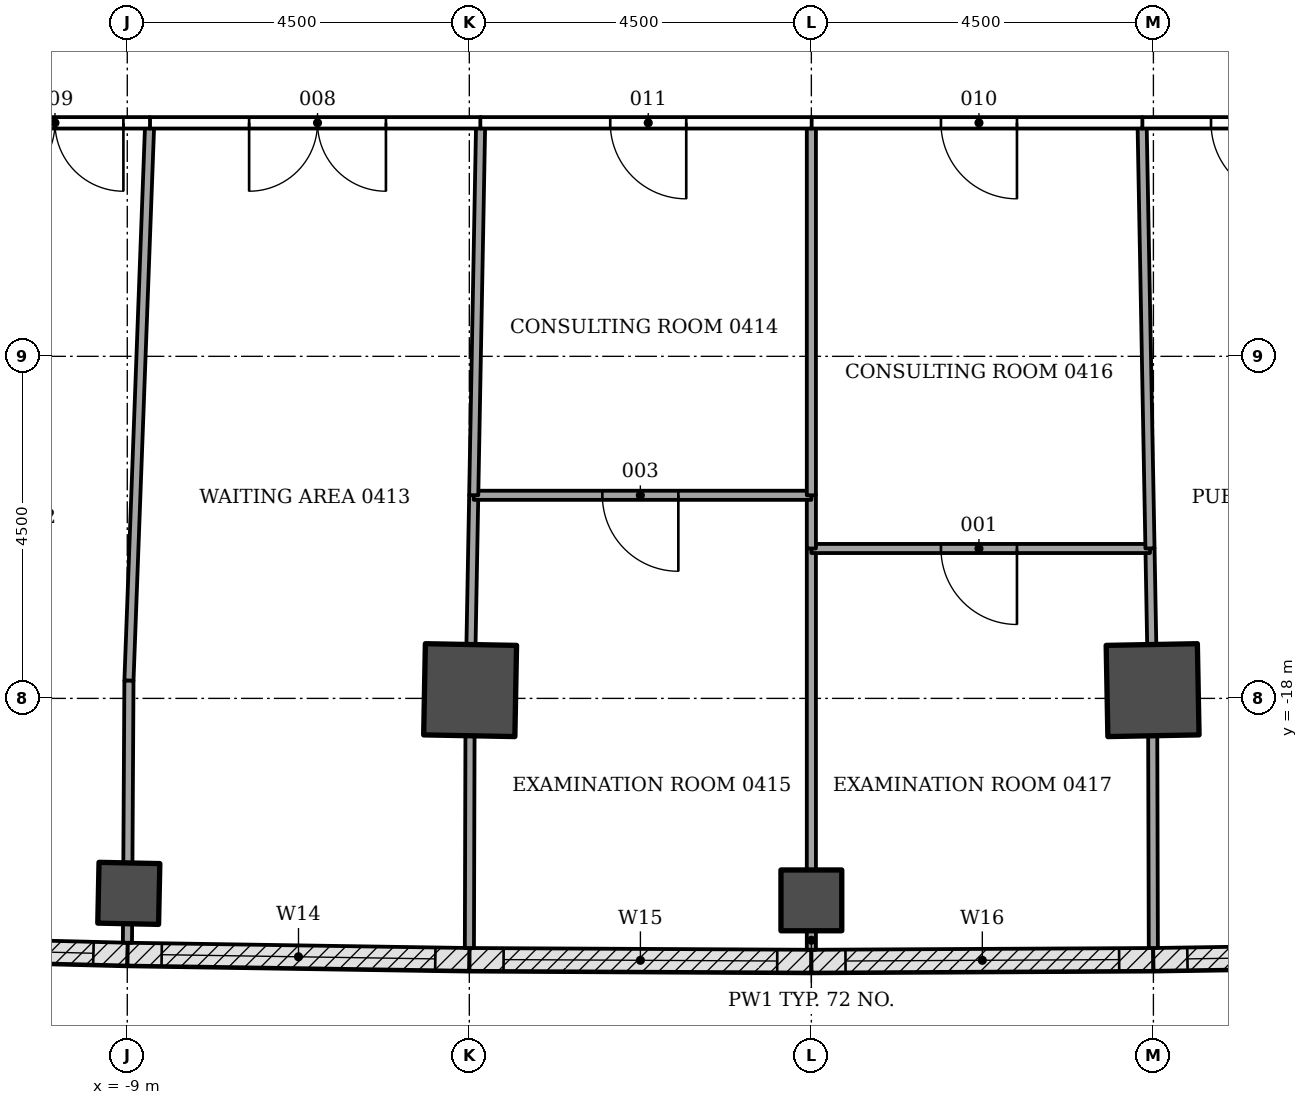
"""IFC4 building model, lengths in metres.
Left out: names, types, materials, properties, quantities, classifications, styles, units other than length and angle.
Written with IfcOpenShell. Run it as: python <this file> out.ifc"""

import sys

from ifc_helpers import new_model, si_unit, direction, frame, frame_2d, origin, origin_2d, place, context, subcontext, project, spatial, rectangle, extrude, element, fill, save


model = new_model("IFC4")
c1 = context("Model", 3, precision=1e-05, world=origin(), true_north=direction((0.0, 1.0)))
c2 = subcontext(c1, "Body", "Model", "MODEL_VIEW")
j1 = project(units=[si_unit("LENGTHUNIT", "METRE"), si_unit("PLANEANGLEUNIT", "RADIAN")], contexts=[c1])
p1 = place(None, origin())
s1 = spatial("IfcSite", under=j1, at=p1, CompositionType="ELEMENT")
p2 = place(p1, origin())
s2 = spatial("IfcBuilding", under=s1, at=p2, CompositionType="ELEMENT")
p3 = place(p2, frame((0.0, 0.0, 19.5)))
s3 = spatial("IfcBuildingStorey", under=s2, at=p3, CompositionType="ELEMENT", Elevation=19.5)
for number, where, z_axis, x_axis in (
    (1, (-4.49, -17.892, -0.25), (0.0, 0.0, 1.0), (-0.019, -1.0, 0.0)),
    (2, (4.49, -17.892, -0.25), (0.0, 0.0, 1.0), (0.019, -1.0, 0.0)),
):
    element("IfcColumn", number, at=place(p3, frame(where, z_axis=z_axis, x_axis=x_axis)), inside=s3, PredefinedType="COLUMN", context=c2, shape_type="SweptSolid", body=[
        extrude(rectangle(XDim=1.2, YDim=1.2, at=origin_2d()), origin(), (0.0, 0.0, 1.0), 4.55),
    ])
for number, where, z_axis, x_axis in (
    (3, (-8.98, -20.565, -0.25), (0.0, 0.0, 1.0), (-0.021, -1.0, 0.0)),
    (4, (0.0, -20.657, -0.25), (0.0, 0.0, 1.0), (0.0, -1.0, 0.0)),
):
    element("IfcColumn", number, at=place(p3, frame(where, z_axis=z_axis, x_axis=x_axis)), inside=s3, PredefinedType="COLUMN", context=c2, shape_type="SweptSolid", body=[
        extrude(rectangle(XDim=0.8, YDim=0.8, at=origin_2d()), origin(), (0.0, 0.0, 1.0), 4.55),
    ])
p4 = place(p3, frame((-9.922, -5.728, -0.25), z_axis=(0.0, 0.0, 1.0), x_axis=(-0.866028046028, -0.499995423472, 0.0)))
e5 = element("IfcWall", 5, at=p4, inside=s3, PredefinedType="SHEAR", context=c2, shape_type="SweptSolid", body=[
    extrude(rectangle(XDim=14.633, YDim=0.9, at=frame_2d((7.316, 0.0))), origin(), (0.0, 0.0, 1.0), 4.55),
])
p5 = place(p4, frame((7.35, 0.0, 0.25)))
e6 = element("IfcOpeningElement", 6, at=p5, cuts=e5, PredefinedType="OPENING", context=c2, shape_type="SweptSolid", body=[
    extrude(rectangle(XDim=1.5, YDim=2.1, at=frame_2d((0.75, 1.05))), frame((0.0, 0.46, 0.0), z_axis=(0.0, -1.0, 0.0), x_axis=(1.0, 0.0, 0.0)), (0.0, 0.0, 1.0), 0.92),
])
p6 = place(p3, frame((-8.998, -21.365, 0.0), z_axis=(0.0, 0.0, 1.0), x_axis=(-0.999671466587, 0.025631209312, 0.0)))
e7 = element("IfcWall", 7, at=p6, inside=s3, PredefinedType="NOTDEFINED", context=c2, shape_type="SweptSolid", body=[
    extrude(rectangle(XDim=4.496, YDim=0.3, at=frame_2d((2.248, 0.0))), origin(), (0.0, 0.0, 1.0), 4.3),
])
p7 = place(p6, frame((0.448, 0.0, 1.5)))
e8 = element("IfcOpeningElement", 8, at=p7, cuts=e7, PredefinedType="OPENING", context=c2, shape_type="SweptSolid", body=[
    extrude(rectangle(XDim=3.6, YDim=1.8, at=frame_2d((1.8, 0.9))), frame((0.0, 0.16, 0.0), z_axis=(0.0, -1.0, 0.0), x_axis=(1.0, 0.0, 0.0)), (0.0, 0.0, 1.0), 0.32),
])
p8 = place(p3, frame((-4.5, -21.434, 0.0), z_axis=(0.0, 0.0, 1.0), x_axis=(-0.999881921814, 0.015366926462, 0.0)))
e9 = element("IfcWall", 9, at=p8, inside=s3, PredefinedType="NOTDEFINED", context=c2, shape_type="SweptSolid", body=[
    extrude(rectangle(XDim=4.496, YDim=0.3, at=frame_2d((2.248, 0.0))), origin(), (0.0, 0.0, 1.0), 4.3),
])
p9 = place(p8, frame((0.448, 0.0, 1.5)))
e10 = element("IfcOpeningElement", 10, at=p9, cuts=e9, PredefinedType="OPENING", context=c2, shape_type="SweptSolid", body=[
    extrude(rectangle(XDim=3.6, YDim=1.8, at=frame_2d((1.8, 0.9))), frame((0.0, 0.16, 0.0), z_axis=(0.0, -1.0, 0.0), x_axis=(1.0, 0.0, 0.0)), (0.0, 0.0, 1.0), 0.32),
])
p10 = place(p3, frame((-0.001, -21.457, 0.0), z_axis=(0.0, 0.0, 1.0), x_axis=(-0.999986693461, 0.005158769258, 0.0)))
e11 = element("IfcWall", 11, at=p10, inside=s3, PredefinedType="NOTDEFINED", context=c2, shape_type="SweptSolid", body=[
    extrude(rectangle(XDim=4.496, YDim=0.3, at=frame_2d((2.248, 0.0))), origin(), (0.0, 0.0, 1.0), 4.3),
])
p11 = place(p10, frame((0.448, 0.0, 1.5)))
e12 = element("IfcOpeningElement", 12, at=p11, cuts=e11, PredefinedType="OPENING", context=c2, shape_type="SweptSolid", body=[
    extrude(rectangle(XDim=3.6, YDim=1.8, at=frame_2d((1.8, 0.9))), frame((0.0, 0.16, 0.0), z_axis=(0.0, -1.0, 0.0), x_axis=(1.0, 0.0, 0.0)), (0.0, 0.0, 1.0), 0.32),
])
p12 = place(p3, frame((4.497, -21.434, 0.0), z_axis=(0.0, 0.0, 1.0), x_axis=(-0.999986693461, -0.005158769258, 0.0)))
e13 = element("IfcWall", 13, at=p12, inside=s3, PredefinedType="NOTDEFINED", context=c2, shape_type="SweptSolid", body=[
    extrude(rectangle(XDim=4.496, YDim=0.3, at=frame_2d((2.248, 0.0))), origin(), (0.0, 0.0, 1.0), 4.3),
])
p13 = place(p12, frame((0.448, 0.0, 1.5)))
e14 = element("IfcOpeningElement", 14, at=p13, cuts=e13, PredefinedType="OPENING", context=c2, shape_type="SweptSolid", body=[
    extrude(rectangle(XDim=3.6, YDim=1.8, at=frame_2d((1.8, 0.9))), frame((0.0, 0.16, 0.0), z_axis=(0.0, -1.0, 0.0), x_axis=(1.0, 0.0, 0.0)), (0.0, 0.0, 1.0), 0.32),
])
p14 = place(p3, frame((8.995, -21.365, 0.0), z_axis=(0.0, 0.0, 1.0), x_axis=(-0.999881921814, -0.015366926462, 0.0)))
e15 = element("IfcWall", 15, at=p14, inside=s3, PredefinedType="NOTDEFINED", context=c2, shape_type="SweptSolid", body=[
    extrude(rectangle(XDim=4.496, YDim=0.3, at=frame_2d((2.248, 0.0))), origin(), (0.0, 0.0, 1.0), 4.3),
])
p15 = place(p14, frame((0.448, 0.0, 1.5)))
e16 = element("IfcOpeningElement", 16, at=p15, cuts=e15, PredefinedType="OPENING", context=c2, shape_type="SweptSolid", body=[
    extrude(rectangle(XDim=3.6, YDim=1.8, at=frame_2d((1.8, 0.9))), frame((0.0, 0.16, 0.0), z_axis=(0.0, -1.0, 0.0), x_axis=(1.0, 0.0, 0.0)), (0.0, 0.0, 1.0), 0.32),
])
p16 = place(p3, frame((0.0, -21.057, 0.0), z_axis=(0.0, 0.0, 1.0), x_axis=(0.0, -1.0, 0.0)))
e17 = element("IfcWall", 17, at=p16, inside=s3, PredefinedType="PARTITIONING", context=c2, shape_type="SweptSolid", body=[
    extrude(rectangle(XDim=0.25, YDim=0.12, at=frame_2d((0.125, 0.0))), origin(), (0.0, 0.0, 1.0), 4.3),
])
p17 = place(p3, frame((0.0, -16.024, 0.0), z_axis=(0.0, 0.0, 1.0), x_axis=(0.0, -1.0, 0.0)))
e18 = element("IfcWall", 18, at=p17, inside=s3, PredefinedType="PARTITIONING", context=c2, shape_type="SweptSolid", body=[
    extrude(rectangle(XDim=4.233, YDim=0.12, at=frame_2d((2.117, 0.0))), origin(), (0.0, 0.0, 1.0), 3.18),
])
p18 = place(p3, frame((4.478, -17.291, 0.0), z_axis=(0.0, 0.0, 1.0), x_axis=(-0.018108783452, 0.999836022537, 0.0)))
e19 = element("IfcWall", 19, at=p18, inside=s3, PredefinedType="PARTITIONING", context=c2, shape_type="SweptSolid", body=[
    extrude(rectangle(XDim=1.267, YDim=0.12, at=frame_2d((0.634, 0.0))), origin(), (0.0, 0.0, 1.0), 3.698),
])
p19 = place(p3, frame((4.499, -21.284, 0.0), z_axis=(0.0, 0.0, 1.0), x_axis=(-0.00288561233, 0.999995836612, 0.0)))
e20 = element("IfcWall", 20, at=p19, inside=s3, PredefinedType="PARTITIONING", context=c2, shape_type="SweptSolid", body=[
    extrude(rectangle(XDim=2.792, YDim=0.12, at=frame_2d((1.396, 0.0))), origin(), (0.0, 0.0, 1.0), 3.683),
])
p20 = place(p3, frame((4.455, -16.028, 0.0), z_axis=(0.0, 0.0, 1.0), x_axis=(-1.0, 0.0, 0.0)))
e21 = element("IfcWall", 21, at=p20, inside=s3, PredefinedType="PARTITIONING", context=c2, shape_type="SweptSolid", body=[
    extrude(rectangle(XDim=4.455, YDim=0.12, at=frame_2d((2.228, 0.0))), origin(), (0.0, 0.0, 1.0), 3.688),
])
p21 = place(p20, frame((1.75, 0.0, 0.0)))
e22 = element("IfcOpeningElement", 22, at=p21, cuts=e21, PredefinedType="OPENING", context=c2, shape_type="SweptSolid", body=[
    extrude(rectangle(XDim=1.0, YDim=2.1, at=frame_2d((0.5, 1.05))), frame((0.0, 0.07, 0.0), z_axis=(0.0, -1.0, 0.0), x_axis=(1.0, 0.0, 0.0)), (0.0, 0.0, 1.0), 0.14),
])
p22 = place(p3, frame((-4.491, -18.492, 0.0), z_axis=(0.0, 0.0, 1.0), x_axis=(-0.00288561233, -0.999995836612, 0.0)))
e23 = element("IfcWall", 23, at=p22, inside=s3, PredefinedType="PARTITIONING", context=c2, shape_type="SweptSolid", body=[
    extrude(rectangle(XDim=2.792, YDim=0.12, at=frame_2d((1.396, 0.0))), origin(), (0.0, 0.0, 1.0), 3.683),
])
p23 = place(p3, frame((-4.442, -15.324, 0.0), z_axis=(0.0, 0.0, 1.0), x_axis=(-0.018366021708, -0.999831330399, 0.0)))
e24 = element("IfcWall", 24, at=p23, inside=s3, PredefinedType="PARTITIONING", context=c2, shape_type="SweptSolid", body=[
    extrude(rectangle(XDim=1.967, YDim=0.12, at=frame_2d((0.984, 0.0))), origin(), (0.0, 0.0, 1.0), 3.698),
])
p24 = place(p3, frame((0.0, -16.028, 0.0), z_axis=(0.0, 0.0, 1.0), x_axis=(0.0, 1.0, 0.0)))
e25 = element("IfcWall", 25, at=p24, inside=s3, PredefinedType="PARTITIONING", context=c2, shape_type="SweptSolid", body=[
    extrude(rectangle(XDim=0.704, YDim=0.12, at=frame_2d((0.352, 0.0))), origin(), (0.0, 0.0, 1.0), 3.688),
])
p25 = place(p3, frame((0.0, -15.328, 0.0), z_axis=(0.0, 0.0, 1.0), x_axis=(-1.0, 0.0, 0.0)))
e26 = element("IfcWall", 26, at=p25, inside=s3, PredefinedType="PARTITIONING", context=c2, shape_type="SweptSolid", body=[
    extrude(rectangle(XDim=4.442, YDim=0.12, at=frame_2d((2.221, 0.0))), origin(), (0.0, 0.0, 1.0), 3.688),
])
p26 = place(p25, frame((1.75, 0.0, 0.0)))
e27 = element("IfcOpeningElement", 27, at=p26, cuts=e26, PredefinedType="OPENING", context=c2, shape_type="SweptSolid", body=[
    extrude(rectangle(XDim=1.0, YDim=2.1, at=frame_2d((0.5, 1.05))), frame((0.0, 0.07, 0.0), z_axis=(0.0, -1.0, 0.0), x_axis=(1.0, 0.0, 0.0)), (0.0, 0.0, 1.0), 0.14),
])
p27 = place(p3, frame((4.351, -10.429, 0.0), z_axis=(0.0, 0.0, 1.0), x_axis=(0.018575076386, -0.999827468385, 0.0)))
e28 = element("IfcWall", 28, at=p27, inside=s3, PredefinedType="PARTITIONING", context=c2, shape_type="SweptSolid", body=[
    extrude(rectangle(XDim=5.599, YDim=0.12, at=frame_2d((2.8, 0.0))), origin(), (0.0, 0.0, 1.0), 3.698),
])
p28 = place(p3, frame((7.208, -10.428, 0.0), z_axis=(0.0, 0.0, 1.0), x_axis=(-1.0, 0.0, 0.0)))
e29 = element("IfcWall", 29, at=p28, inside=s3, PredefinedType="PARTITIONING", context=c2, shape_type="SweptSolid", body=[
    extrude(rectangle(XDim=2.861, YDim=0.15, at=frame_2d((1.431, 0.0))), origin(), (0.0, 0.0, 1.0), 3.698),
])
p29 = place(p28, frame((0.95, 0.0, 0.0)))
e30 = element("IfcOpeningElement", 30, at=p29, cuts=e29, PredefinedType="OPENING", context=c2, shape_type="SweptSolid", body=[
    extrude(rectangle(XDim=1.0, YDim=2.1, at=frame_2d((0.5, 1.05))), frame((0.0, 0.085, 0.0), z_axis=(0.0, -1.0, 0.0), x_axis=(1.0, 0.0, 0.0)), (0.0, 0.0, 1.0), 0.17),
])
p30 = place(p3, frame((-8.996, -20.965, 0.0), z_axis=(0.0, 0.0, 1.0), x_axis=(-0.007812261592, -0.999969483819, 0.0)))
e31 = element("IfcWall", 31, at=p30, inside=s3, PredefinedType="PARTITIONING", context=c2, shape_type="SweptSolid", body=[
    extrude(rectangle(XDim=0.25, YDim=0.12, at=frame_2d((0.125, 0.0))), origin(), (0.0, 0.0, 1.0), 4.3),
])
p31 = place(p3, frame((-8.705, -10.429, 0.0), z_axis=(0.0, 0.0, 1.0), x_axis=(-0.037170289837, -0.999308945999, 0.0)))
e32 = element("IfcWall", 32, at=p31, inside=s3, PredefinedType="PARTITIONING", context=c2, shape_type="SweptSolid", body=[
    extrude(rectangle(XDim=7.343, YDim=0.12, at=frame_2d((3.672, 0.0))), origin(), (0.0, 0.0, 1.0), 3.18),
])
p32 = place(p3, frame((-8.978, -17.767, 0.0), z_axis=(0.0, 0.0, 1.0), x_axis=(-0.005803200997, -0.999983161287, 0.0)))
e33 = element("IfcWall", 33, at=p32, inside=s3, PredefinedType="PARTITIONING", context=c2, shape_type="SweptSolid", body=[
    extrude(rectangle(XDim=2.398, YDim=0.12, at=frame_2d((1.199, 0.0))), origin(), (0.0, 0.0, 1.0), 3.18),
])
p33 = place(p3, frame((-4.442, -15.327, 0.0), z_axis=(0.0, 0.0, 1.0), x_axis=(0.018539331325, 0.999828131828, 0.0)))
e34 = element("IfcWall", 34, at=p33, inside=s3, PredefinedType="PARTITIONING", context=c2, shape_type="SweptSolid", body=[
    extrude(rectangle(XDim=4.899, YDim=0.12, at=frame_2d((2.449, 0.0))), origin(), (0.0, 0.0, 1.0), 3.698),
])
p34 = place(p3, frame((-4.347, -10.428, 0.0), z_axis=(0.0, 0.0, 1.0), x_axis=(-1.0, 0.0, 0.0)))
e35 = element("IfcWall", 35, at=p34, inside=s3, PredefinedType="PARTITIONING", context=c2, shape_type="SweptSolid", body=[
    extrude(rectangle(XDim=4.362, YDim=0.15, at=frame_2d((2.181, 0.0))), origin(), (0.0, 0.0, 1.0), 3.698),
])
p35 = place(p34, frame((1.25, 0.0, 0.0)))
e36 = element("IfcOpeningElement", 36, at=p35, cuts=e35, PredefinedType="OPENING", context=c2, shape_type="SweptSolid", body=[
    extrude(rectangle(XDim=1.8, YDim=2.1, at=frame_2d((0.9, 1.05))), frame((0.0, 0.085, 0.0), z_axis=(0.0, -1.0, 0.0), x_axis=(1.0, 0.0, 0.0)), (0.0, 0.0, 1.0), 0.17),
])
p36 = place(p3, frame((-8.701, -10.428, 0.0), z_axis=(0.0, 0.0, 1.0), x_axis=(-1.0, 0.0, 0.0)))
e37 = element("IfcWall", 37, at=p36, inside=s3, PredefinedType="PARTITIONING", context=c2, shape_type="SweptSolid", body=[
    extrude(rectangle(XDim=2.548, YDim=0.15, at=frame_2d((1.274, 0.0))), origin(), (0.0, 0.0, 1.0), 3.698),
])
p37 = place(p36, frame((0.35, 0.0, 0.0)))
e38 = element("IfcOpeningElement", 38, at=p37, cuts=e37, PredefinedType="OPENING", context=c2, shape_type="SweptSolid", body=[
    extrude(rectangle(XDim=1.8, YDim=2.1, at=frame_2d((0.9, 1.05))), frame((0.0, 0.085, 0.0), z_axis=(0.0, -1.0, 0.0), x_axis=(1.0, 0.0, 0.0)), (0.0, 0.0, 1.0), 0.17),
])
p38 = place(p3, frame((0.0, -10.428, 0.0), z_axis=(0.0, 0.0, 1.0), x_axis=(0.0, -1.0, 0.0)))
e39 = element("IfcWall", 39, at=p38, inside=s3, PredefinedType="PARTITIONING", context=c2, shape_type="SweptSolid", body=[
    extrude(rectangle(XDim=4.9, YDim=0.12, at=frame_2d((2.45, 0.0))), origin(), (0.0, 0.0, 1.0), 3.688),
])
p39 = place(p3, frame((4.355, -10.428, 0.0), z_axis=(0.0, 0.0, 1.0), x_axis=(-1.0, 0.0, 0.0)))
e40 = element("IfcWall", 40, at=p39, inside=s3, PredefinedType="PARTITIONING", context=c2, shape_type="SweptSolid", body=[
    extrude(rectangle(XDim=4.359, YDim=0.15, at=frame_2d((2.179, 0.0))), origin(), (0.0, 0.0, 1.0), 3.688),
])
p40 = place(p39, frame((1.65, 0.0, 0.0)))
e41 = element("IfcOpeningElement", 41, at=p40, cuts=e40, PredefinedType="OPENING", context=c2, shape_type="SweptSolid", body=[
    extrude(rectangle(XDim=1.0, YDim=2.1, at=frame_2d((0.5, 1.05))), frame((0.0, 0.085, 0.0), z_axis=(0.0, -1.0, 0.0), x_axis=(1.0, 0.0, 0.0)), (0.0, 0.0, 1.0), 0.17),
])
p41 = place(p3, frame((0.004, -10.428, 0.0), z_axis=(0.0, 0.0, 1.0), x_axis=(-1.0, 0.0, 0.0)))
e42 = element("IfcWall", 42, at=p41, inside=s3, PredefinedType="PARTITIONING", context=c2, shape_type="SweptSolid", body=[
    extrude(rectangle(XDim=4.359, YDim=0.15, at=frame_2d((2.179, 0.0))), origin(), (0.0, 0.0, 1.0), 3.688),
])
p42 = place(p41, frame((1.65, 0.0, 0.0)))
e43 = element("IfcOpeningElement", 43, at=p42, cuts=e42, PredefinedType="OPENING", context=c2, shape_type="SweptSolid", body=[
    extrude(rectangle(XDim=1.0, YDim=2.1, at=frame_2d((0.5, 1.05))), frame((0.0, 0.085, 0.0), z_axis=(0.0, -1.0, 0.0), x_axis=(1.0, 0.0, 0.0)), (0.0, 0.0, 1.0), 0.17),
])
p43 = place(p7, origin())
e44 = element("IfcWindow", 44, at=p43, inside=s3, PartitioningType="SINGLE_PANEL", PredefinedType="WINDOW", context=c2, shape_type="SweptSolid", body=[
    extrude(rectangle(XDim=3.6, YDim=1.8, at=frame_2d((1.8, 0.9))), frame((0.0, 0.03, 0.0), z_axis=(0.0, -1.0, 0.0), x_axis=(1.0, 0.0, 0.0)), (0.0, 0.0, 1.0), 0.06),
])
fill(e8, e44)
p44 = place(p9, origin())
e45 = element("IfcWindow", 45, at=p44, inside=s3, PartitioningType="SINGLE_PANEL", PredefinedType="WINDOW", context=c2, shape_type="SweptSolid", body=[
    extrude(rectangle(XDim=3.6, YDim=1.8, at=frame_2d((1.8, 0.9))), frame((0.0, 0.03, 0.0), z_axis=(0.0, -1.0, 0.0), x_axis=(1.0, 0.0, 0.0)), (0.0, 0.0, 1.0), 0.06),
])
fill(e10, e45)
p45 = place(p11, origin())
e46 = element("IfcWindow", 46, at=p45, inside=s3, PartitioningType="SINGLE_PANEL", PredefinedType="WINDOW", context=c2, shape_type="SweptSolid", body=[
    extrude(rectangle(XDim=3.6, YDim=1.8, at=frame_2d((1.8, 0.9))), frame((0.0, 0.03, 0.0), z_axis=(0.0, -1.0, 0.0), x_axis=(1.0, 0.0, 0.0)), (0.0, 0.0, 1.0), 0.06),
])
fill(e12, e46)
p46 = place(p13, origin())
e47 = element("IfcWindow", 47, at=p46, inside=s3, PartitioningType="SINGLE_PANEL", PredefinedType="WINDOW", context=c2, shape_type="SweptSolid", body=[
    extrude(rectangle(XDim=3.6, YDim=1.8, at=frame_2d((1.8, 0.9))), frame((0.0, 0.03, 0.0), z_axis=(0.0, -1.0, 0.0), x_axis=(1.0, 0.0, 0.0)), (0.0, 0.0, 1.0), 0.06),
])
fill(e14, e47)
p47 = place(p15, origin())
e48 = element("IfcWindow", 48, at=p47, inside=s3, PartitioningType="SINGLE_PANEL", PredefinedType="WINDOW", context=c2, shape_type="SweptSolid", body=[
    extrude(rectangle(XDim=3.6, YDim=1.8, at=frame_2d((1.8, 0.9))), frame((0.0, 0.03, 0.0), z_axis=(0.0, -1.0, 0.0), x_axis=(1.0, 0.0, 0.0)), (0.0, 0.0, 1.0), 0.06),
])
fill(e16, e48)
p48 = place(p21, origin())
e49 = element("IfcDoor", 49, at=p48, inside=s3, OperationType="SINGLE_SWING_RIGHT", PredefinedType="DOOR", context=c2, shape_type="SweptSolid", body=[
    extrude(rectangle(XDim=1.0, YDim=2.1, at=frame_2d((0.5, 1.05))), frame((0.0, 0.025, 0.0), z_axis=(0.0, -1.0, 0.0), x_axis=(1.0, 0.0, 0.0)), (0.0, 0.0, 1.0), 0.05),
])
fill(e22, e49)
p49 = place(p26, origin())
e50 = element("IfcDoor", 50, at=p49, inside=s3, OperationType="SINGLE_SWING_RIGHT", PredefinedType="DOOR", context=c2, shape_type="SweptSolid", body=[
    extrude(rectangle(XDim=1.0, YDim=2.1, at=frame_2d((0.5, 1.05))), frame((0.0, 0.025, 0.0), z_axis=(0.0, -1.0, 0.0), x_axis=(1.0, 0.0, 0.0)), (0.0, 0.0, 1.0), 0.05),
])
fill(e27, e50)
p50 = place(p29, origin())
e51 = element("IfcDoor", 51, at=p50, inside=s3, OperationType="SINGLE_SWING_RIGHT", PredefinedType="DOOR", context=c2, shape_type="SweptSolid", body=[
    extrude(rectangle(XDim=1.0, YDim=2.1, at=frame_2d((0.5, 1.05))), frame((0.0, 0.025, 0.0), z_axis=(0.0, -1.0, 0.0), x_axis=(1.0, 0.0, 0.0)), (0.0, 0.0, 1.0), 0.05),
])
fill(e30, e51)
p51 = place(p35, origin())
e52 = element("IfcDoor", 52, at=p51, inside=s3, OperationType="DOUBLE_DOOR_SINGLE_SWING", PredefinedType="DOOR", context=c2, shape_type="SweptSolid", body=[
    extrude(rectangle(XDim=1.8, YDim=2.1, at=frame_2d((0.9, 1.05))), frame((0.0, 0.025, 0.0), z_axis=(0.0, -1.0, 0.0), x_axis=(1.0, 0.0, 0.0)), (0.0, 0.0, 1.0), 0.05),
])
fill(e36, e52)
p52 = place(p37, origin())
e53 = element("IfcDoor", 53, at=p52, inside=s3, OperationType="DOUBLE_DOOR_SINGLE_SWING", PredefinedType="DOOR", context=c2, shape_type="SweptSolid", body=[
    extrude(rectangle(XDim=1.8, YDim=2.1, at=frame_2d((0.9, 1.05))), frame((0.0, 0.025, 0.0), z_axis=(0.0, -1.0, 0.0), x_axis=(1.0, 0.0, 0.0)), (0.0, 0.0, 1.0), 0.05),
])
fill(e38, e53)
p53 = place(p40, origin())
e54 = element("IfcDoor", 54, at=p53, inside=s3, OperationType="SINGLE_SWING_LEFT", PredefinedType="DOOR", context=c2, shape_type="SweptSolid", body=[
    extrude(rectangle(XDim=1.0, YDim=2.1, at=frame_2d((0.5, 1.05))), frame((0.0, 0.025, 0.0), z_axis=(0.0, -1.0, 0.0), x_axis=(1.0, 0.0, 0.0)), (0.0, 0.0, 1.0), 0.05),
])
fill(e41, e54)
p54 = place(p42, origin())
e55 = element("IfcDoor", 55, at=p54, inside=s3, OperationType="SINGLE_SWING_LEFT", PredefinedType="DOOR", context=c2, shape_type="SweptSolid", body=[
    extrude(rectangle(XDim=1.0, YDim=2.1, at=frame_2d((0.5, 1.05))), frame((0.0, 0.025, 0.0), z_axis=(0.0, -1.0, 0.0), x_axis=(1.0, 0.0, 0.0)), (0.0, 0.0, 1.0), 0.05),
])
fill(e43, e55)
save(model, sys.argv[1])
